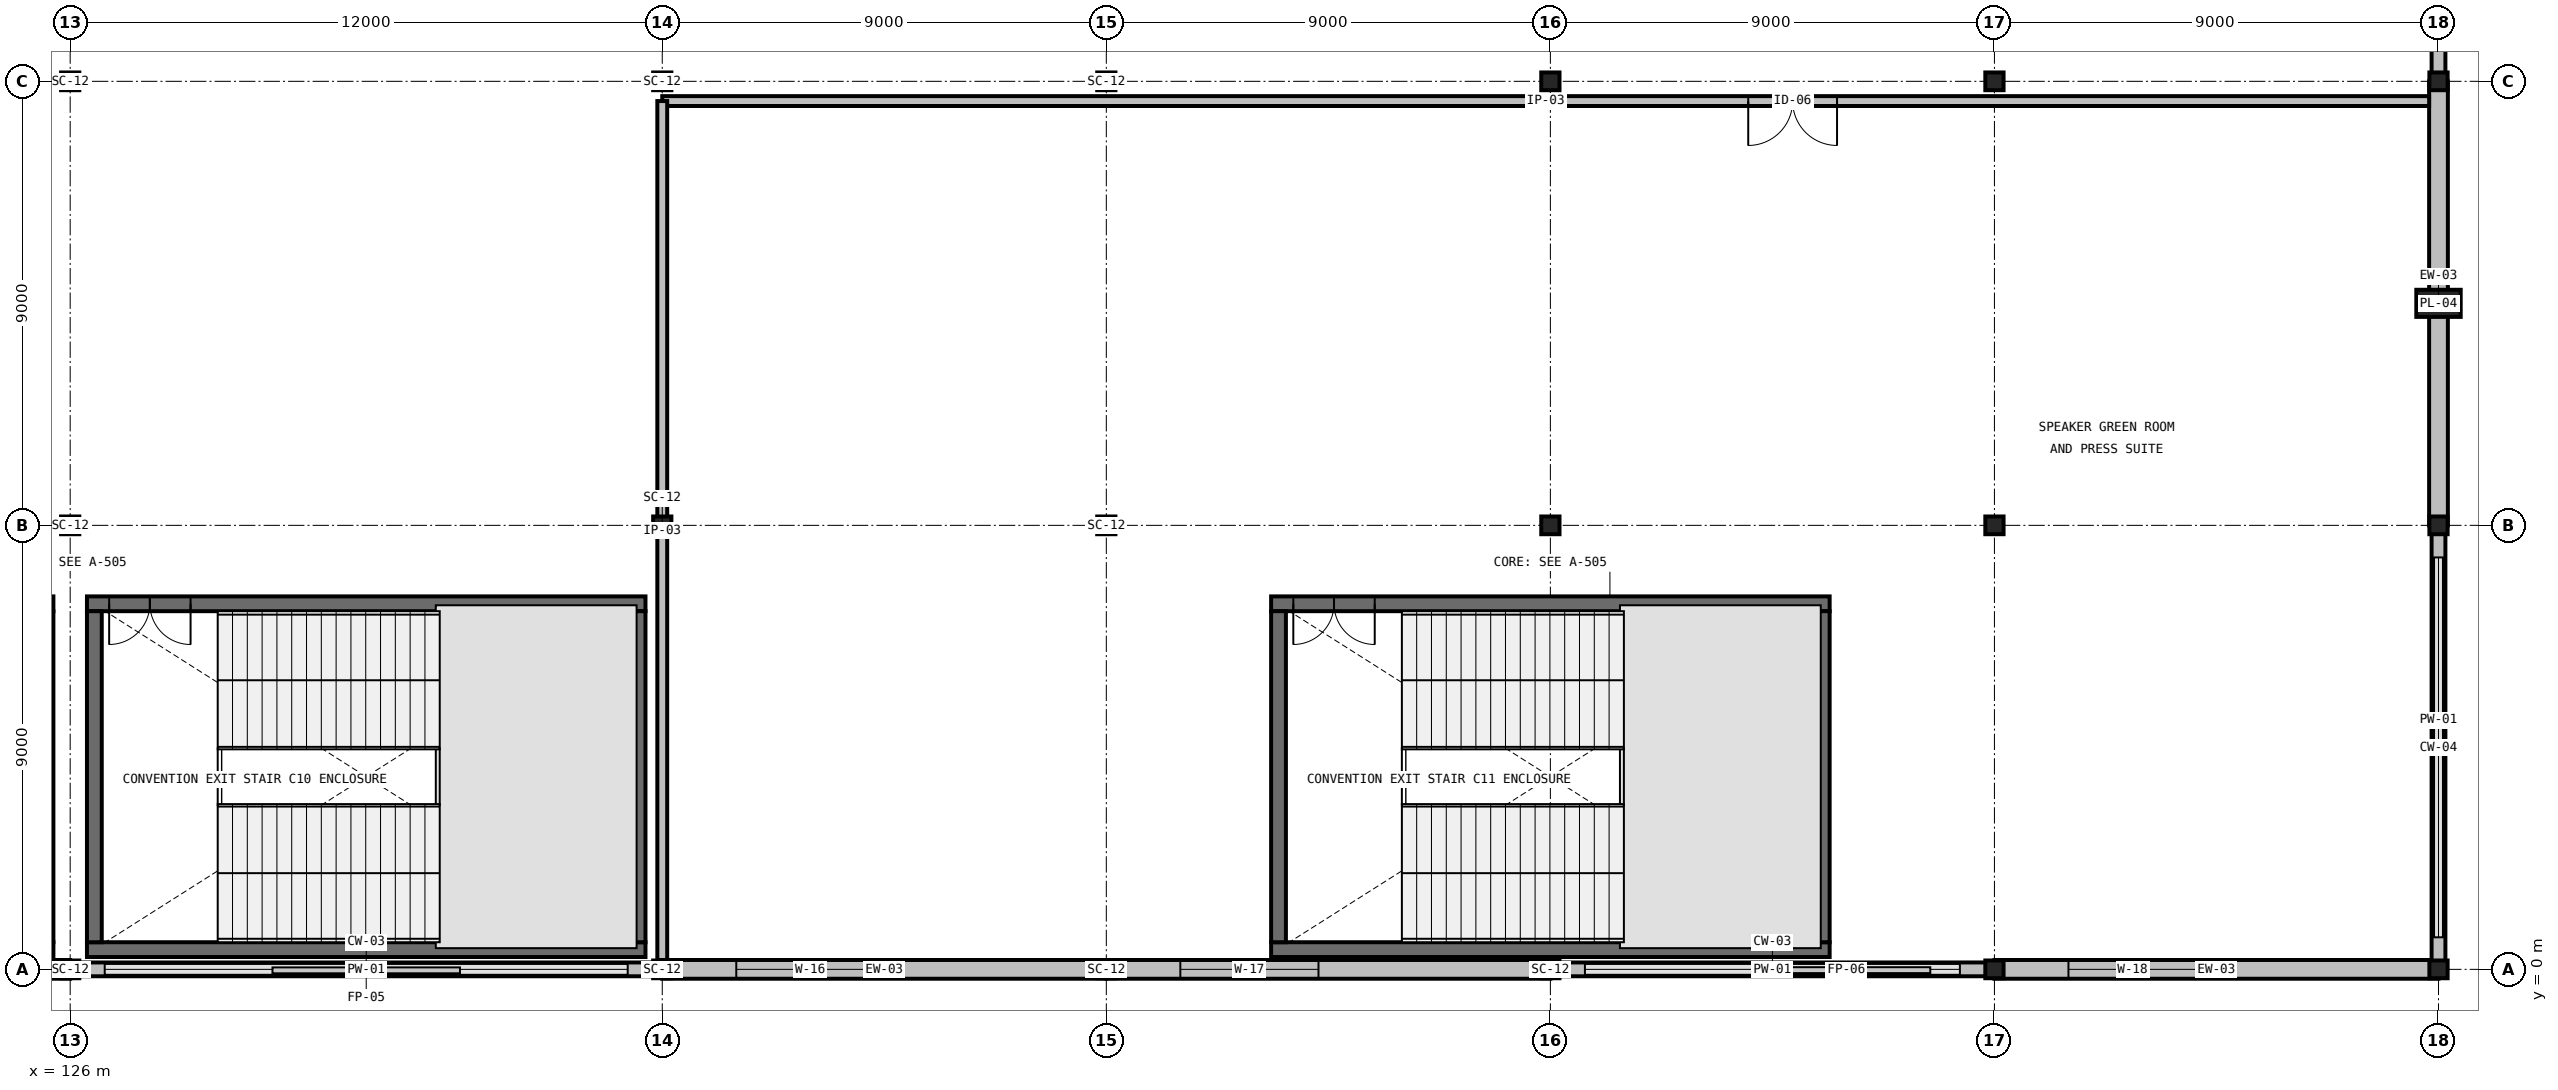
"""IFC4 building model, lengths in metres.
Left out: names, types, materials, properties, quantities, classifications, styles, units other than length and angle.
Written with IfcOpenShell. Run it as: python <this file> out.ifc"""

import sys

from ifc_helpers import new_model, si_unit, direction, frame, frame_2d, origin, origin_2d, place, context, subcontext, project, spatial, rectangle, i_section, extrude, element, fill, save


model = new_model("IFC4")
c1 = context("Model", 3, precision=1e-05, world=origin(), true_north=direction((0.0, 1.0)))
c2 = subcontext(c1, "Body", "Model", "MODEL_VIEW")
j1 = project(units=[si_unit("LENGTHUNIT", "METRE"), si_unit("PLANEANGLEUNIT", "RADIAN")], contexts=[c1])
p1 = place(None, origin())
s1 = spatial("IfcSite", under=j1, at=p1, CompositionType="ELEMENT")
p2 = place(p1, origin())
s2 = spatial("IfcBuilding", under=s1, at=p2, CompositionType="ELEMENT")
p3 = place(p2, frame((0.0, 0.0, 18.0)))
s3 = spatial("IfcBuildingStorey", under=s2, at=p3, CompositionType="ELEMENT", Elevation=18.0)
for number, where, z_axis, x_axis in (
    (1, (126.0, 0.0, 0.0), (0.0, 0.0, 1.0), (1.0, 0.0, 0.0)),
    (2, (126.0, 9.0, 0.0), (0.0, 0.0, 1.0), (1.0, 0.0, 0.0)),
    (3, (126.0, 18.0, 0.0), (0.0, 0.0, 1.0), (1.0, 0.0, 0.0)),
    (4, (138.0, 0.0, 0.0), (0.0, 0.0, 1.0), (1.0, 0.0, 0.0)),
    (5, (138.0, 9.0, 0.0), (0.0, 0.0, 1.0), (1.0, 0.0, 0.0)),
    (6, (138.0, 18.0, 0.0), (0.0, 0.0, 1.0), (1.0, 0.0, 0.0)),
    (7, (147.0, 0.0, 0.0), (0.0, 0.0, 1.0), (1.0, 0.0, 0.0)),
    (8, (147.0, 9.0, 0.0), (0.0, 0.0, 1.0), (1.0, 0.0, 0.0)),
    (9, (147.0, 18.0, 0.0), (0.0, 0.0, 1.0), (1.0, 0.0, 0.0)),
    (10, (156.0, 0.0, 0.0), (0.0, 0.0, 1.0), (1.0, 0.0, 0.0)),
    (11, (156.0, 9.0, 0.0), (0.0, 0.0, 1.0), (1.0, 0.0, 0.0)),
    (12, (156.0, 18.0, 0.0), (0.0, 0.0, 1.0), (1.0, 0.0, 0.0)),
    (13, (165.0, 0.0, 0.0), (0.0, 0.0, 1.0), (1.0, 0.0, 0.0)),
    (14, (165.0, 9.0, 0.0), (0.0, 0.0, 1.0), (1.0, 0.0, 0.0)),
    (15, (165.0, 18.0, 0.0), (0.0, 0.0, 1.0), (1.0, 0.0, 0.0)),
    (16, (174.0, 0.0, 0.0), (0.0, 0.0, 1.0), (1.0, 0.0, 0.0)),
    (17, (174.0, 9.0, 0.0), (0.0, 0.0, 1.0), (1.0, 0.0, 0.0)),
    (18, (174.0, 18.0, 0.0), (0.0, 0.0, 1.0), (1.0, 0.0, 0.0)),
):
    element("IfcColumn", number, at=place(p3, frame(where, z_axis=z_axis, x_axis=x_axis)), inside=s3, PredefinedType="COLUMN", context=c2, shape_type="SweptSolid", body=[
        extrude(i_section(OverallWidth=0.37, OverallDepth=0.36, WebThickness=0.012, FlangeThickness=0.02, FilletRadius=0.031, at=origin_2d()), origin(), (0.0, 0.0, 1.0), 5.4),
    ])
p4 = place(p3, frame((174.0, 13.5, 0.0), z_axis=(0.0, 0.0, 1.0), x_axis=(0.0, 1.0, 0.0)))
e19 = element("IfcColumn", 19, at=p4, inside=s3, PredefinedType="PILASTER", context=c2, shape_type="SweptSolid", body=[
    extrude(rectangle(XDim=0.55, YDim=0.9, at=origin_2d()), origin(), (0.0, 0.0, 1.0), 5.4),
])
p5 = place(p3, frame((125.66, 0.4, 0.0), z_axis=(0.0, 0.0, 1.0), x_axis=(-1.0, 0.0, 0.0)))
e20 = element("IfcWall", 20, at=p5, inside=s3, PredefinedType="SHEAR", context=c2, shape_type="SweptSolid", body=[
    extrude(rectangle(XDim=11.32, YDim=0.3, at=frame_2d((5.66, 0.0))), origin(), (0.0, 0.0, 1.0), 5.4),
])
p6 = place(p3, frame((125.66, 7.41, 0.0), z_axis=(0.0, 0.0, 1.0), x_axis=(-1.0, 0.0, 0.0)))
e21 = element("IfcWall", 21, at=p6, inside=s3, PredefinedType="SHEAR", context=c2, shape_type="SweptSolid", body=[
    extrude(rectangle(XDim=11.32, YDim=0.3, at=frame_2d((5.66, 0.0))), origin(), (0.0, 0.0, 1.0), 5.4),
])
p7 = place(p6, frame((9.22, 0.0, 0.0)))
e22 = element("IfcOpeningElement", 22, at=p7, cuts=e21, PredefinedType="OPENING", context=c2, shape_type="SweptSolid", body=[
    extrude(rectangle(XDim=1.65, YDim=2.25, at=frame_2d((0.825, 1.125))), frame((0.0, 0.165, 0.0), z_axis=(0.0, -1.0, 0.0), x_axis=(1.0, 0.0, 0.0)), (0.0, 0.0, 1.0), 0.33),
])
p8 = place(p3, frame((125.51, 0.55, 0.0), z_axis=(0.0, 0.0, 1.0), x_axis=(0.0, 1.0, 0.0)))
e23 = element("IfcWall", 23, at=p8, inside=s3, PredefinedType="SHEAR", context=c2, shape_type="SweptSolid", body=[
    extrude(rectangle(XDim=6.71, YDim=0.3, at=frame_2d((3.355, 0.0))), origin(), (0.0, 0.0, 1.0), 5.4),
])
p9 = place(p3, frame((137.66, 0.4, 0.0), z_axis=(0.0, 0.0, 1.0), x_axis=(-1.0, 0.0, 0.0)))
e24 = element("IfcWall", 24, at=p9, inside=s3, PredefinedType="SHEAR", context=c2, shape_type="SweptSolid", body=[
    extrude(rectangle(XDim=11.32, YDim=0.3, at=frame_2d((5.66, 0.0))), origin(), (0.0, 0.0, 1.0), 5.4),
])
p10 = place(p3, frame((137.66, 7.41, 0.0), z_axis=(0.0, 0.0, 1.0), x_axis=(-1.0, 0.0, 0.0)))
e25 = element("IfcWall", 25, at=p10, inside=s3, PredefinedType="SHEAR", context=c2, shape_type="SweptSolid", body=[
    extrude(rectangle(XDim=11.32, YDim=0.3, at=frame_2d((5.66, 0.0))), origin(), (0.0, 0.0, 1.0), 5.4),
])
p11 = place(p10, frame((9.22, 0.0, 0.0)))
e26 = element("IfcOpeningElement", 26, at=p11, cuts=e25, PredefinedType="OPENING", context=c2, shape_type="SweptSolid", body=[
    extrude(rectangle(XDim=1.65, YDim=2.25, at=frame_2d((0.825, 1.125))), frame((0.0, 0.165, 0.0), z_axis=(0.0, -1.0, 0.0), x_axis=(1.0, 0.0, 0.0)), (0.0, 0.0, 1.0), 0.33),
])
for number, where, z_axis, x_axis in (
    (27, (126.49, 7.26, 0.0), (0.0, 0.0, 1.0), (0.0, -1.0, 0.0)),
    (28, (137.51, 0.55, 0.0), (0.0, 0.0, 1.0), (0.0, 1.0, 0.0)),
):
    element("IfcWall", number, at=place(p3, frame(where, z_axis=z_axis, x_axis=x_axis)), inside=s3, PredefinedType="SHEAR", context=c2, shape_type="SweptSolid", body=[
        extrude(rectangle(XDim=6.71, YDim=0.3, at=frame_2d((3.355, 0.0))), origin(), (0.0, 0.0, 1.0), 5.4),
    ])
p12 = place(p3, frame((161.66, 0.4, 0.0), z_axis=(0.0, 0.0, 1.0), x_axis=(-1.0, 0.0, 0.0)))
e29 = element("IfcWall", 29, at=p12, inside=s3, PredefinedType="SHEAR", context=c2, shape_type="SweptSolid", body=[
    extrude(rectangle(XDim=11.32, YDim=0.3, at=frame_2d((5.66, 0.0))), origin(), (0.0, 0.0, 1.0), 5.4),
])
p13 = place(p3, frame((161.66, 7.41, 0.0), z_axis=(0.0, 0.0, 1.0), x_axis=(-1.0, 0.0, 0.0)))
e30 = element("IfcWall", 30, at=p13, inside=s3, PredefinedType="SHEAR", context=c2, shape_type="SweptSolid", body=[
    extrude(rectangle(XDim=11.32, YDim=0.3, at=frame_2d((5.66, 0.0))), origin(), (0.0, 0.0, 1.0), 5.4),
])
p14 = place(p13, frame((9.22, 0.0, 0.0)))
e31 = element("IfcOpeningElement", 31, at=p14, cuts=e30, PredefinedType="OPENING", context=c2, shape_type="SweptSolid", body=[
    extrude(rectangle(XDim=1.65, YDim=2.25, at=frame_2d((0.825, 1.125))), frame((0.0, 0.165, 0.0), z_axis=(0.0, -1.0, 0.0), x_axis=(1.0, 0.0, 0.0)), (0.0, 0.0, 1.0), 0.33),
])
for number, where, z_axis, x_axis in (
    (32, (150.49, 7.26, 0.0), (0.0, 0.0, 1.0), (0.0, -1.0, 0.0)),
    (33, (161.51, 0.55, 0.0), (0.0, 0.0, 1.0), (0.0, 1.0, 0.0)),
):
    element("IfcWall", number, at=place(p3, frame(where, z_axis=z_axis, x_axis=x_axis)), inside=s3, PredefinedType="SHEAR", context=c2, shape_type="SweptSolid", body=[
        extrude(rectangle(XDim=6.71, YDim=0.3, at=frame_2d((3.355, 0.0))), origin(), (0.0, 0.0, 1.0), 5.4),
    ])
p15 = place(p3, frame((114.0, 0.0, 0.0), z_axis=(0.0, 0.0, 1.0), x_axis=(1.0, 0.0, 0.0)))
e34 = element("IfcWall", 34, at=p15, inside=s3, PredefinedType="STANDARD", context=c2, shape_type="SweptSolid", body=[
    extrude(rectangle(XDim=12.0, YDim=0.38, at=frame_2d((6.0, 0.0))), origin(), (0.0, 0.0, 1.0), 4.176),
])
p16 = place(p15, frame((1.5, 0.0, 0.85)))
e35 = element("IfcOpeningElement", 35, at=p16, cuts=e34, PredefinedType="OPENING", context=c2, shape_type="SweptSolid", body=[
    extrude(rectangle(XDim=2.2, YDim=1.95, at=frame_2d((1.1, 0.975))), frame((0.0, 0.205, 0.0), z_axis=(0.0, -1.0, 0.0), x_axis=(1.0, 0.0, 0.0)), (0.0, 0.0, 1.0), 0.41),
])
p17 = place(p3, frame((126.0, 0.0, 0.0), z_axis=(0.0, 0.0, 1.0), x_axis=(1.0, 0.0, 0.0)))
e36 = element("IfcWall", 36, at=p17, inside=s3, PredefinedType="PARAPET", context=c2, shape_type="SweptSolid", body=[
    extrude(rectangle(XDim=12.0, YDim=0.28, at=frame_2d((6.0, 0.0))), origin(), (0.0, 0.0, 1.0), 0.2),
])
p18 = place(p3, frame((138.0, 0.0, 0.0), z_axis=(0.0, 0.0, 1.0), x_axis=(1.0, 0.0, 0.0)))
e37 = element("IfcWall", 37, at=p18, inside=s3, PredefinedType="STANDARD", context=c2, shape_type="SweptSolid", body=[
    extrude(rectangle(XDim=9.0, YDim=0.38, at=frame_2d((4.5, 0.0))), origin(), (0.0, 0.0, 1.0), 4.176),
])
p19 = place(p18, frame((1.5, 0.0, 0.85)))
e38 = element("IfcOpeningElement", 38, at=p19, cuts=e37, PredefinedType="OPENING", context=c2, shape_type="SweptSolid", body=[
    extrude(rectangle(XDim=3.0, YDim=2.3, at=frame_2d((1.5, 1.15))), frame((0.0, 0.205, 0.0), z_axis=(0.0, -1.0, 0.0), x_axis=(1.0, 0.0, 0.0)), (0.0, 0.0, 1.0), 0.41),
])
p20 = place(p3, frame((147.0, 0.0, 0.0), z_axis=(0.0, 0.0, 1.0), x_axis=(1.0, 0.0, 0.0)))
e39 = element("IfcWall", 39, at=p20, inside=s3, PredefinedType="STANDARD", context=c2, shape_type="SweptSolid", body=[
    extrude(rectangle(XDim=9.0, YDim=0.38, at=frame_2d((4.5, 0.0))), origin(), (0.0, 0.0, 1.0), 4.176),
])
p21 = place(p20, frame((1.5, 0.0, 0.85)))
e40 = element("IfcOpeningElement", 40, at=p21, cuts=e39, PredefinedType="OPENING", context=c2, shape_type="SweptSolid", body=[
    extrude(rectangle(XDim=2.8, YDim=2.4, at=frame_2d((1.4, 1.2))), frame((0.0, 0.205, 0.0), z_axis=(0.0, -1.0, 0.0), x_axis=(1.0, 0.0, 0.0)), (0.0, 0.0, 1.0), 0.41),
])
p22 = place(p3, frame((156.0, 0.0, 0.0), z_axis=(0.0, 0.0, 1.0), x_axis=(1.0, 0.0, 0.0)))
e41 = element("IfcWall", 41, at=p22, inside=s3, PredefinedType="PARAPET", context=c2, shape_type="SweptSolid", body=[
    extrude(rectangle(XDim=9.0, YDim=0.28, at=frame_2d((4.5, 0.0))), origin(), (0.0, 0.0, 1.0), 0.2),
])
p23 = place(p3, frame((165.0, 0.0, 0.0), z_axis=(0.0, 0.0, 1.0), x_axis=(1.0, 0.0, 0.0)))
e42 = element("IfcWall", 42, at=p23, inside=s3, PredefinedType="STANDARD", context=c2, shape_type="SweptSolid", body=[
    extrude(rectangle(XDim=9.0, YDim=0.38, at=frame_2d((4.5, 0.0))), origin(), (0.0, 0.0, 1.0), 4.176),
])
p24 = place(p23, frame((1.5, 0.0, 0.85)))
e43 = element("IfcOpeningElement", 43, at=p24, cuts=e42, PredefinedType="OPENING", context=c2, shape_type="SweptSolid", body=[
    extrude(rectangle(XDim=2.6, YDim=2.25, at=frame_2d((1.3, 1.125))), frame((0.0, 0.205, 0.0), z_axis=(0.0, -1.0, 0.0), x_axis=(1.0, 0.0, 0.0)), (0.0, 0.0, 1.0), 0.41),
])
p25 = place(p3, frame((174.0, 0.0, 0.0), z_axis=(0.0, 0.0, 1.0), x_axis=(0.0, 1.0, 0.0)))
e44 = element("IfcWall", 44, at=p25, inside=s3, PredefinedType="PARAPET", context=c2, shape_type="SweptSolid", body=[
    extrude(rectangle(XDim=9.0, YDim=0.28, at=frame_2d((4.5, 0.0))), origin(), (0.0, 0.0, 1.0), 0.2),
])
p26 = place(p3, frame((174.0, 9.0, 0.0), z_axis=(0.0, 0.0, 1.0), x_axis=(0.0, 1.0, 0.0)))
e45 = element("IfcWall", 45, at=p26, inside=s3, PredefinedType="STANDARD", context=c2, shape_type="SweptSolid", body=[
    extrude(rectangle(XDim=9.0, YDim=0.38, at=frame_2d((4.5, 0.0))), origin(), (0.0, 0.0, 1.0), 4.669),
])
p27 = place(p3, frame((174.0, 18.0, 0.0), z_axis=(0.0, 0.0, 1.0), x_axis=(0.0, 1.0, 0.0)))
e46 = element("IfcWall", 46, at=p27, inside=s3, PredefinedType="PARAPET", context=c2, shape_type="SweptSolid", body=[
    extrude(rectangle(XDim=9.0, YDim=0.28, at=frame_2d((4.5, 0.0))), origin(), (0.0, 0.0, 1.0), 0.2),
])
p28 = place(p3, frame((173.81, 17.6, 0.0), z_axis=(0.0, 0.0, 1.0), x_axis=(-1.0, 0.0, 0.0)))
e47 = element("IfcWall", 47, at=p28, inside=s3, PredefinedType="PARTITIONING", context=c2, shape_type="SweptSolid", body=[
    extrude(rectangle(XDim=35.81, YDim=0.2, at=frame_2d((17.905, 0.0))), origin(), (0.0, 0.0, 1.0), 5.08),
])
p29 = place(p28, frame((12.0, 0.0, 0.0)))
e48 = element("IfcOpeningElement", 48, at=p29, cuts=e47, PredefinedType="OPENING", context=c2, shape_type="SweptSolid", body=[
    extrude(rectangle(XDim=1.8, YDim=2.3, at=frame_2d((0.9, 1.15))), frame((0.0, 0.115, 0.0), z_axis=(0.0, -1.0, 0.0), x_axis=(1.0, 0.0, 0.0)), (0.0, 0.0, 1.0), 0.23),
])
p30 = place(p3, frame((138.0, 17.6, 0.0), z_axis=(0.0, 0.0, 1.0), x_axis=(0.0, -1.0, 0.0)))
e49 = element("IfcWall", 49, at=p30, inside=s3, PredefinedType="PARTITIONING", context=c2, shape_type="SweptSolid", body=[
    extrude(rectangle(XDim=17.41, YDim=0.2, at=frame_2d((8.705, 0.0))), origin(), (0.0, 0.0, 1.0), 4.313),
])
p31 = place(p11, origin())
e50 = element("IfcDoor", 50, at=p31, inside=s3, OperationType="DOUBLE_DOOR_SINGLE_SWING", PredefinedType="DOOR", context=c2, shape_type="SweptSolid", body=[
    extrude(rectangle(XDim=1.65, YDim=2.25, at=frame_2d((0.825, 1.125))), frame((0.0, 0.025, 0.0), z_axis=(0.0, -1.0, 0.0), x_axis=(1.0, 0.0, 0.0)), (0.0, 0.0, 1.0), 0.05),
])
fill(e26, e50)
p32 = place(p14, origin())
e51 = element("IfcDoor", 51, at=p32, inside=s3, OperationType="DOUBLE_DOOR_SINGLE_SWING", PredefinedType="DOOR", context=c2, shape_type="SweptSolid", body=[
    extrude(rectangle(XDim=1.65, YDim=2.25, at=frame_2d((0.825, 1.125))), frame((0.0, 0.025, 0.0), z_axis=(0.0, -1.0, 0.0), x_axis=(1.0, 0.0, 0.0)), (0.0, 0.0, 1.0), 0.05),
])
fill(e31, e51)
p33 = place(p19, origin())
e52 = element("IfcWindow", 52, at=p33, inside=s3, PartitioningType="TRIPLE_PANEL_VERTICAL", PredefinedType="WINDOW", context=c2, shape_type="SweptSolid", body=[
    extrude(rectangle(XDim=3.0, YDim=2.3, at=frame_2d((1.5, 1.15))), frame((0.0, 0.03, 0.0), z_axis=(0.0, -1.0, 0.0), x_axis=(1.0, 0.0, 0.0)), (0.0, 0.0, 1.0), 0.06),
])
fill(e38, e52)
p34 = place(p21, origin())
e53 = element("IfcWindow", 53, at=p34, inside=s3, PartitioningType="DOUBLE_PANEL_VERTICAL", PredefinedType="WINDOW", context=c2, shape_type="SweptSolid", body=[
    extrude(rectangle(XDim=2.8, YDim=2.4, at=frame_2d((1.4, 1.2))), frame((0.0, 0.03, 0.0), z_axis=(0.0, -1.0, 0.0), x_axis=(1.0, 0.0, 0.0)), (0.0, 0.0, 1.0), 0.06),
])
fill(e40, e53)
p35 = place(p24, origin())
e54 = element("IfcWindow", 54, at=p35, inside=s3, PartitioningType="DOUBLE_PANEL_VERTICAL", PredefinedType="WINDOW", context=c2, shape_type="SweptSolid", body=[
    extrude(rectangle(XDim=2.6, YDim=2.25, at=frame_2d((1.3, 1.125))), frame((0.0, 0.03, 0.0), z_axis=(0.0, -1.0, 0.0), x_axis=(1.0, 0.0, 0.0)), (0.0, 0.0, 1.0), 0.06),
])
fill(e43, e54)
p36 = place(p29, origin())
e55 = element("IfcDoor", 55, at=p36, inside=s3, OperationType="DOUBLE_DOOR_SINGLE_SWING", PredefinedType="DOOR", context=c2, shape_type="SweptSolid", body=[
    extrude(rectangle(XDim=1.8, YDim=2.3, at=frame_2d((0.9, 1.15))), frame((0.0, 0.025, 0.0), z_axis=(0.0, -1.0, 0.0), x_axis=(1.0, 0.0, 0.0)), (0.0, 0.0, 1.0), 0.05),
])
fill(e48, e55)
save(model, sys.argv[1])
